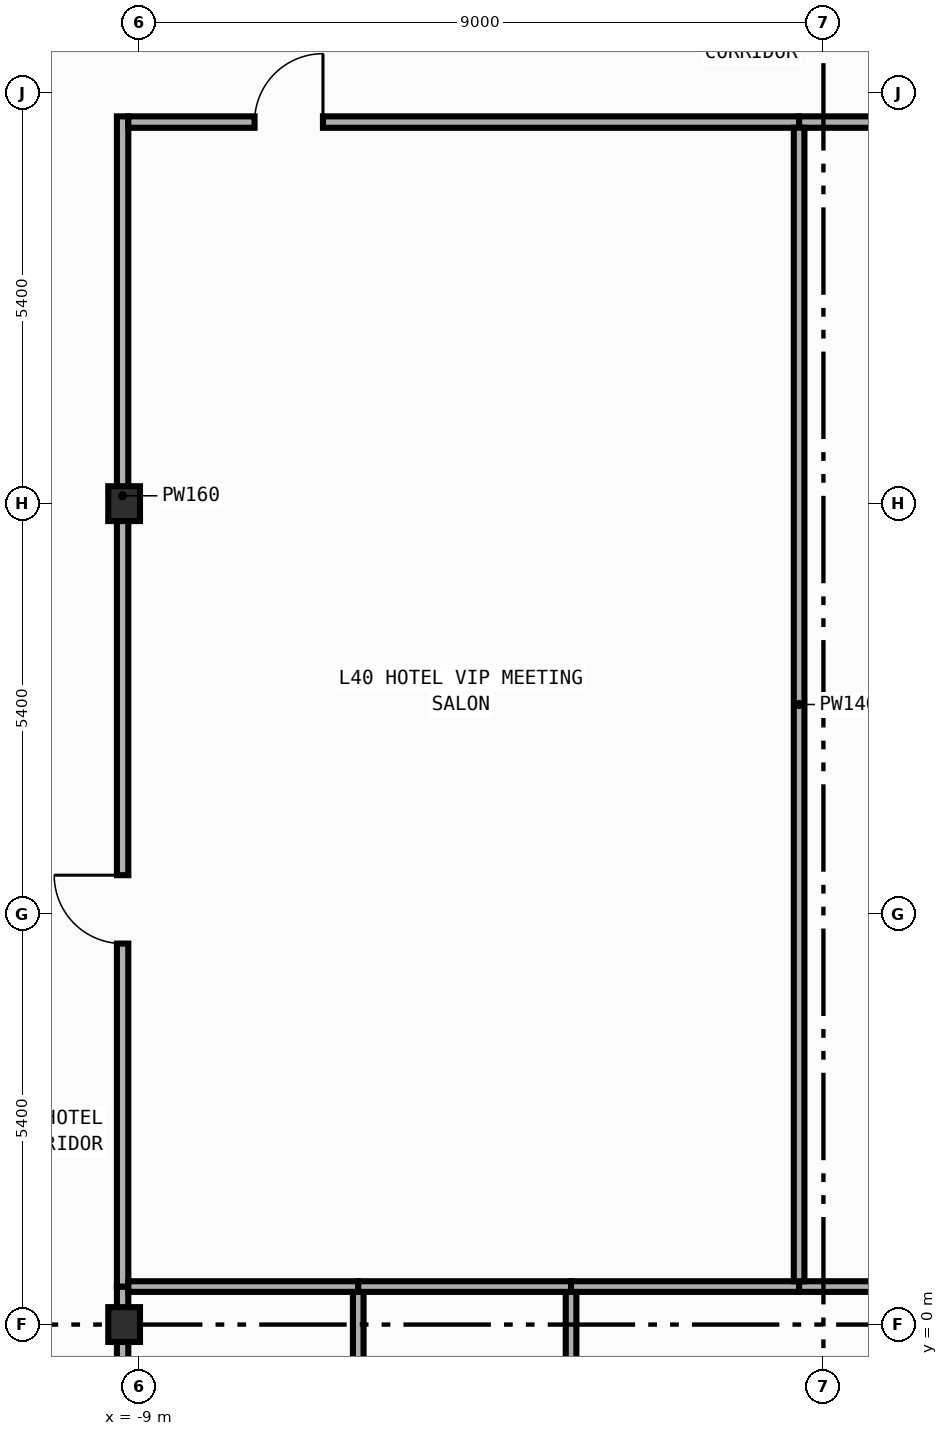
"""IFC4 building model, lengths in metres.
Left out: names, types, materials, properties, quantities, classifications, styles, units other than length and angle.
Written with IfcOpenShell. Run it as: python <this file> out.ifc"""

import sys

from ifc_helpers import new_model, si_unit, direction, frame, frame_2d, origin, origin_2d, place, context, subcontext, project, spatial, rectangle, i_section, extrude, element, fill, save


model = new_model("IFC4")
c1 = context("Model", 3, precision=1e-05, world=origin(), true_north=direction((0.0, 1.0)))
c2 = subcontext(c1, "Body", "Model", "MODEL_VIEW")
j1 = project(units=[si_unit("LENGTHUNIT", "METRE"), si_unit("PLANEANGLEUNIT", "RADIAN")], contexts=[c1])
p1 = place(None, origin())
s1 = spatial("IfcSite", under=j1, at=p1, CompositionType="ELEMENT")
p2 = place(p1, origin())
s2 = spatial("IfcBuilding", under=s1, at=p2, CompositionType="ELEMENT")
p3 = place(p2, frame((0.0, 0.0, 176.4)))
s3 = spatial("IfcBuildingStorey", under=s2, at=p3, CompositionType="ELEMENT", Elevation=176.4)
for number, where, z_axis, x_axis in (
    (1, (-9.2, 0.0, 0.0), (0.0, 0.0, 1.0), (1.0, 0.0, 0.0)),
    (2, (-9.2, 10.8, 0.0), (0.0, 0.0, 1.0), (1.0, 0.0, 0.0)),
):
    element("IfcColumn", number, at=place(p3, frame(where, z_axis=z_axis, x_axis=x_axis)), inside=s3, PredefinedType="COLUMN", context=c2, shape_type="SweptSolid", body=[
        extrude(i_section(OverallWidth=0.417, OverallDepth=0.458, WebThickness=0.03, FlangeThickness=0.05, FilletRadius=0.022, at=origin_2d()), origin(), (0.0, 0.0, 1.0), 3.8),
    ])
p4 = place(p3, frame((-9.22, -14.595, 0.0), z_axis=(0.0, 0.0, 1.0), x_axis=(0.0, 1.0, 0.0)))
e3 = element("IfcWall", 3, at=p4, inside=s3, PredefinedType="PARTITIONING", context=c2, shape_type="SweptSolid", body=[
    extrude(rectangle(XDim=15.095, YDim=0.15, at=frame_2d((7.547, 0.0))), origin(), (0.0, 0.0, 1.0), 2.952),
])
p5 = place(p4, frame((8.707, 0.0, 0.0)))
e4 = element("IfcOpeningElement", 4, at=p5, cuts=e3, PredefinedType="OPENING", context=c2, shape_type="SweptSolid", body=[
    extrude(rectangle(XDim=0.9, YDim=2.15, at=frame_2d((0.45, 1.075))), frame((0.0, 0.085, 0.0), z_axis=(0.0, -1.0, 0.0), x_axis=(1.0, 0.0, 0.0)), (0.0, 0.0, 1.0), 0.17),
])
p6 = place(p3, frame((-9.22, 0.5, 0.0), z_axis=(0.0, 0.0, 1.0), x_axis=(0.0, 1.0, 0.0)))
e5 = element("IfcWall", 5, at=p6, inside=s3, PredefinedType="PARTITIONING", context=c2, shape_type="SweptSolid", body=[
    extrude(rectangle(XDim=15.395, YDim=0.15, at=frame_2d((7.698, 0.0))), origin(), (0.0, 0.0, 1.0), 2.952),
])
p7 = place(p6, frame((4.512, 0.0, 0.0)))
e6 = element("IfcOpeningElement", 6, at=p7, cuts=e5, PredefinedType="OPENING", context=c2, shape_type="SweptSolid", body=[
    extrude(rectangle(XDim=0.9, YDim=2.15, at=frame_2d((0.45, 1.075))), frame((0.0, 0.085, 0.0), z_axis=(0.0, -1.0, 0.0), x_axis=(1.0, 0.0, 0.0)), (0.0, 0.0, 1.0), 0.17),
])
p8 = place(p3, frame((-9.145, 15.82, 0.0), z_axis=(0.0, 0.0, 1.0), x_axis=(1.0, 0.0, 0.0)))
e7 = element("IfcWall", 7, at=p8, inside=s3, PredefinedType="PARTITIONING", context=c2, shape_type="SweptSolid", body=[
    extrude(rectangle(XDim=8.825, YDim=0.15, at=frame_2d((4.413, 0.0))), origin(), (0.0, 0.0, 1.0), 3.54),
])
p9 = place(p8, frame((1.661, 0.0, 0.0)))
e8 = element("IfcOpeningElement", 8, at=p9, cuts=e7, PredefinedType="OPENING", context=c2, shape_type="SweptSolid", body=[
    extrude(rectangle(XDim=0.9, YDim=2.15, at=frame_2d((0.45, 1.075))), frame((0.0, 0.085, 0.0), z_axis=(0.0, -1.0, 0.0), x_axis=(1.0, 0.0, 0.0)), (0.0, 0.0, 1.0), 0.17),
])
p10 = place(p3, frame((-0.32, 15.82, 0.0), z_axis=(0.0, 0.0, 1.0), x_axis=(1.0, 0.0, 0.0)))
e9 = element("IfcWall", 9, at=p10, inside=s3, PredefinedType="PARTITIONING", context=c2, shape_type="SweptSolid", body=[
    extrude(rectangle(XDim=9.465, YDim=0.15, at=frame_2d((4.732, 0.0))), origin(), (0.0, 0.0, 1.0), 3.54),
])
p11 = place(p10, frame((6.898, 0.0, 0.0)))
e10 = element("IfcOpeningElement", 10, at=p11, cuts=e9, PredefinedType="OPENING", context=c2, shape_type="SweptSolid", body=[
    extrude(rectangle(XDim=0.9, YDim=2.15, at=frame_2d((0.45, 1.075))), frame((0.0, 0.085, 0.0), z_axis=(0.0, -1.0, 0.0), x_axis=(1.0, 0.0, 0.0)), (0.0, 0.0, 1.0), 0.17),
])
p12 = place(p3, frame((-6.12, -14.445, 0.0), z_axis=(0.0, 0.0, 1.0), x_axis=(0.0, 1.0, 0.0)))
e11 = element("IfcWall", 11, at=p12, inside=s3, PredefinedType="PARTITIONING", context=c2, shape_type="SweptSolid", body=[
    extrude(rectangle(XDim=14.875, YDim=0.14, at=frame_2d((7.438, 0.0))), origin(), (0.0, 0.0, 1.0), 3.54),
])
p13 = place(p3, frame((-9.145, 0.5, 0.0), z_axis=(0.0, 0.0, 1.0), x_axis=(1.0, 0.0, 0.0)))
e12 = element("IfcWall", 12, at=p13, inside=s3, PredefinedType="PARTITIONING", context=c2, shape_type="SweptSolid", body=[
    extrude(rectangle(XDim=3.025, YDim=0.14, at=frame_2d((1.512, 0.0))), origin(), (0.0, 0.0, 1.0), 3.54),
])
p14 = place(p3, frame((-3.32, -14.445, 0.0), z_axis=(0.0, 0.0, 1.0), x_axis=(0.0, 1.0, 0.0)))
e13 = element("IfcWall", 13, at=p14, inside=s3, PredefinedType="PARTITIONING", context=c2, shape_type="SweptSolid", body=[
    extrude(rectangle(XDim=14.875, YDim=0.14, at=frame_2d((7.438, 0.0))), origin(), (0.0, 0.0, 1.0), 3.54),
])
p15 = place(p3, frame((-6.12, 0.5, 0.0), z_axis=(0.0, 0.0, 1.0), x_axis=(1.0, 0.0, 0.0)))
e14 = element("IfcWall", 14, at=p15, inside=s3, PredefinedType="PARTITIONING", context=c2, shape_type="SweptSolid", body=[
    extrude(rectangle(XDim=2.8, YDim=0.14, at=frame_2d((1.4, 0.0))), origin(), (0.0, 0.0, 1.0), 3.54),
])
p16 = place(p3, frame((-3.32, 0.5, 0.0), z_axis=(0.0, 0.0, 1.0), x_axis=(1.0, 0.0, 0.0)))
e15 = element("IfcWall", 15, at=p16, inside=s3, PredefinedType="PARTITIONING", context=c2, shape_type="SweptSolid", body=[
    extrude(rectangle(XDim=3.0, YDim=0.14, at=frame_2d((1.5, 0.0))), origin(), (0.0, 0.0, 1.0), 3.54),
])
p17 = place(p3, frame((-0.32, 0.5, 0.0), z_axis=(0.0, 0.0, 1.0), x_axis=(1.0, 0.0, 0.0)))
e16 = element("IfcWall", 16, at=p17, inside=s3, PredefinedType="PARTITIONING", context=c2, shape_type="SweptSolid", body=[
    extrude(rectangle(XDim=4.76, YDim=0.14, at=frame_2d((2.38, 0.0))), origin(), (0.0, 0.0, 1.0), 3.54),
])
p18 = place(p3, frame((-0.32, 0.57, 0.0), z_axis=(0.0, 0.0, 1.0), x_axis=(0.0, 1.0, 0.0)))
e17 = element("IfcWall", 17, at=p18, inside=s3, PredefinedType="PARTITIONING", context=c2, shape_type="SweptSolid", body=[
    extrude(rectangle(XDim=15.175, YDim=0.14, at=frame_2d((7.587, 0.0))), origin(), (0.0, 0.0, 1.0), 3.54),
])
p19 = place(p7, origin())
e18 = element("IfcDoor", 18, at=p19, inside=s3, OperationType="SINGLE_SWING_RIGHT", PredefinedType="DOOR", context=c2, shape_type="SweptSolid", body=[
    extrude(rectangle(XDim=0.9, YDim=2.15, at=frame_2d((0.45, 1.075))), frame((0.0, 0.025, 0.0), z_axis=(0.0, -1.0, 0.0), x_axis=(1.0, 0.0, 0.0)), (0.0, 0.0, 1.0), 0.05),
])
fill(e6, e18)
p20 = place(p9, origin())
e19 = element("IfcDoor", 19, at=p20, inside=s3, OperationType="SINGLE_SWING_RIGHT", PredefinedType="DOOR", context=c2, shape_type="SweptSolid", body=[
    extrude(rectangle(XDim=0.9, YDim=2.15, at=frame_2d((0.45, 1.075))), frame((0.0, 0.025, 0.0), z_axis=(0.0, -1.0, 0.0), x_axis=(1.0, 0.0, 0.0)), (0.0, 0.0, 1.0), 0.05),
])
fill(e8, e19)
save(model, sys.argv[1])
